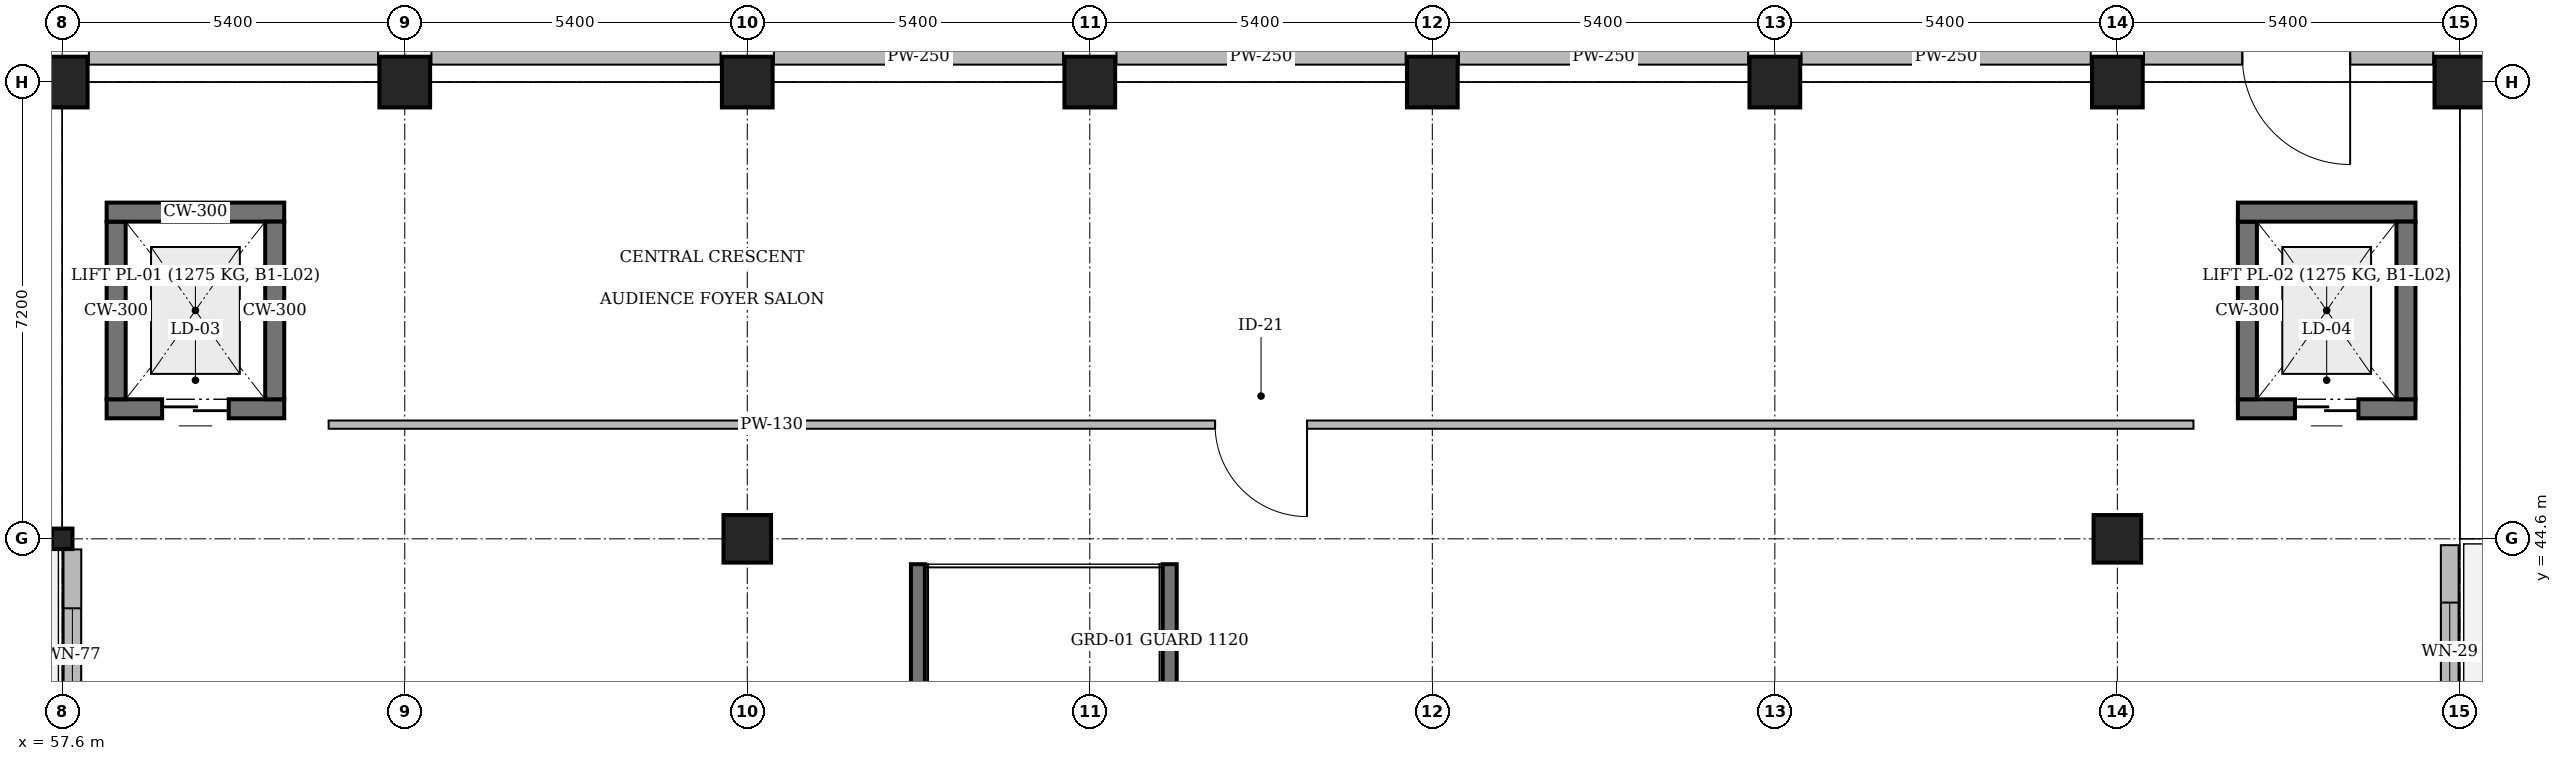
"""IFC4 building model, lengths in metres.
Left out: names, types, materials, properties, quantities, classifications, styles, units other than length and angle.
Written with IfcOpenShell. Run it as: python <this file> out.ifc"""

import sys

from ifc_helpers import new_model, si_unit, direction, frame, frame_2d, origin, origin_2d, place, context, subcontext, project, spatial, rectangle, circle, hollow_circle, extrude, element, fill, save


model = new_model("IFC4")
c1 = context("Model", 3, precision=1e-05, world=origin(), true_north=direction((0.0, 1.0)))
c2 = subcontext(c1, "Body", "Model", "MODEL_VIEW")
j1 = project(units=[si_unit("LENGTHUNIT", "METRE"), si_unit("PLANEANGLEUNIT", "RADIAN")], contexts=[c1])
p1 = place(None, origin())
s1 = spatial("IfcSite", under=j1, at=p1, CompositionType="ELEMENT")
p2 = place(p1, origin())
s2 = spatial("IfcBuilding", under=s1, at=p2, CompositionType="ELEMENT")
p3 = place(p2, origin())
s3 = spatial("IfcBuildingStorey", under=s2, at=p3, CompositionType="ELEMENT", Elevation=0.0)
p4 = place(p3, frame((68.4, 44.6, 0.0), z_axis=(0.0, 0.0, 1.0), x_axis=(1.0, 0.0, 0.0)))
e1 = element("IfcColumn", 1, at=p4, inside=s3, PredefinedType="COLUMN", context=c2, shape_type="SweptSolid", body=[
    extrude(circle(Radius=0.375, at=origin_2d()), origin(), (0.0, 0.0, 1.0), 4.8),
])
for number, where, z_axis, x_axis in (
    (2, (68.4, 51.8, 0.0), (0.0, 0.0, 1.0), (1.0, 0.0, 0.0)),
    (3, (73.8, 51.8, 0.0), (0.0, 0.0, 1.0), (1.0, 0.0, 0.0)),
    (4, (79.2, 51.8, 0.0), (0.0, 0.0, 1.0), (1.0, 0.0, 0.0)),
    (5, (84.6, 51.8, 0.0), (0.0, 0.0, 1.0), (1.0, 0.0, 0.0)),
):
    element("IfcColumn", number, at=place(p3, frame(where, z_axis=z_axis, x_axis=x_axis)), inside=s3, PredefinedType="COLUMN", context=c2, shape_type="SweptSolid", body=[
        extrude(rectangle(XDim=0.8, YDim=0.8, at=origin_2d()), origin(), (0.0, 0.0, 1.0), 4.8),
    ])
p5 = place(p3, frame((90.0, 44.6, 0.0), z_axis=(0.0, 0.0, 1.0), x_axis=(1.0, 0.0, 0.0)))
e6 = element("IfcColumn", 6, at=p5, inside=s3, PredefinedType="COLUMN", context=c2, shape_type="SweptSolid", body=[
    extrude(circle(Radius=0.375, at=origin_2d()), origin(), (0.0, 0.0, 1.0), 4.8),
])
for number, where, z_axis, x_axis in (
    (7, (90.0, 51.8, 0.0), (0.0, 0.0, 1.0), (1.0, 0.0, 0.0)),
    (8, (95.4, 51.8, 0.0), (0.0, 0.0, 1.0), (1.0, 0.0, 0.0)),
):
    element("IfcColumn", number, at=place(p3, frame(where, z_axis=z_axis, x_axis=x_axis)), inside=s3, PredefinedType="COLUMN", context=c2, shape_type="SweptSolid", body=[
        extrude(rectangle(XDim=0.8, YDim=0.8, at=origin_2d()), origin(), (0.0, 0.0, 1.0), 4.8),
    ])
p6 = place(p3, frame((57.6, 44.6, 0.0), z_axis=(0.0, 0.0, 1.0), x_axis=(1.0, 0.0, 0.0)))
e9 = element("IfcColumn", 9, at=p6, inside=s3, PredefinedType="COLUMN", context=c2, shape_type="SweptSolid", body=[
    extrude(hollow_circle(Radius=0.162, WallThickness=0.012, at=origin_2d()), origin(), (0.0, 0.0, 1.0), 4.8),
])
for number, where, z_axis, x_axis in (
    (10, (57.6, 51.8, 0.0), (0.0, 0.0, 1.0), (1.0, 0.0, 0.0)),
    (11, (63.0, 51.8, 0.0), (0.0, 0.0, 1.0), (1.0, 0.0, 0.0)),
):
    element("IfcColumn", number, at=place(p3, frame(where, z_axis=z_axis, x_axis=x_axis)), inside=s3, PredefinedType="COLUMN", context=c2, shape_type="SweptSolid", body=[
        extrude(rectangle(XDim=0.8, YDim=0.8, at=origin_2d()), origin(), (0.0, 0.0, 1.0), 4.8),
    ])
p7 = place(p3, frame((61.1, 46.65, 0.0), z_axis=(0.0, 0.0, 1.0), x_axis=(-1.0, 0.0, 0.0)))
e12 = element("IfcWall", 12, at=p7, inside=s3, PredefinedType="SOLIDWALL", context=c2, shape_type="SweptSolid", body=[
    extrude(rectangle(XDim=2.8, YDim=0.3, at=frame_2d((1.4, 0.0))), origin(), (0.0, 0.0, 1.0), 4.8),
])
p8 = place(p7, frame((0.875, 0.0, 0.0)))
e13 = element("IfcOpeningElement", 13, at=p8, cuts=e12, PredefinedType="OPENING", context=c2, shape_type="SweptSolid", body=[
    extrude(rectangle(XDim=1.05, YDim=2.1, at=frame_2d((0.525, 1.05))), frame((0.0, 0.17, 0.0), z_axis=(0.0, -1.0, 0.0), x_axis=(1.0, 0.0, 0.0)), (0.0, 0.0, 1.0), 0.34),
])
for number, where, z_axis, x_axis in (
    (14, (58.45, 46.8, 0.0), (0.0, 0.0, 1.0), (0.0, 1.0, 0.0)),
    (15, (58.3, 49.75, 0.0), (0.0, 0.0, 1.0), (1.0, 0.0, 0.0)),
    (16, (60.95, 49.6, 0.0), (0.0, 0.0, 1.0), (0.0, -1.0, 0.0)),
):
    element("IfcWall", number, at=place(p3, frame(where, z_axis=z_axis, x_axis=x_axis)), inside=s3, PredefinedType="SOLIDWALL", context=c2, shape_type="SweptSolid", body=[
        extrude(rectangle(XDim=2.8, YDim=0.3, at=frame_2d((1.4, 0.0))), origin(), (0.0, 0.0, 1.0), 4.8),
    ])
p9 = place(p3, frame((94.7, 46.65, 0.0), z_axis=(0.0, 0.0, 1.0), x_axis=(-1.0, 0.0, 0.0)))
e17 = element("IfcWall", 17, at=p9, inside=s3, PredefinedType="SOLIDWALL", context=c2, shape_type="SweptSolid", body=[
    extrude(rectangle(XDim=2.8, YDim=0.3, at=frame_2d((1.4, 0.0))), origin(), (0.0, 0.0, 1.0), 4.8),
])
p10 = place(p9, frame((0.9, 0.0, 0.0)))
e18 = element("IfcOpeningElement", 18, at=p10, cuts=e17, PredefinedType="OPENING", context=c2, shape_type="SweptSolid", body=[
    extrude(rectangle(XDim=1.0, YDim=2.1, at=frame_2d((0.5, 1.05))), frame((0.0, 0.17, 0.0), z_axis=(0.0, -1.0, 0.0), x_axis=(1.0, 0.0, 0.0)), (0.0, 0.0, 1.0), 0.34),
])
for number, where, z_axis, x_axis in (
    (19, (92.05, 46.8, 0.0), (0.0, 0.0, 1.0), (0.0, 1.0, 0.0)),
    (20, (91.9, 49.75, 0.0), (0.0, 0.0, 1.0), (1.0, 0.0, 0.0)),
    (21, (94.55, 49.6, 0.0), (0.0, 0.0, 1.0), (0.0, -1.0, 0.0)),
):
    element("IfcWall", number, at=place(p3, frame(where, z_axis=z_axis, x_axis=x_axis)), inside=s3, PredefinedType="SOLIDWALL", context=c2, shape_type="SweptSolid", body=[
        extrude(rectangle(XDim=2.8, YDim=0.3, at=frame_2d((1.4, 0.0))), origin(), (0.0, 0.0, 1.0), 4.8),
    ])
for number, where, z_axis, x_axis in (
    (22, (71.09, 36.6, 0.0), (0.0, 0.0, 1.0), (0.0, 1.0, 0.0)),
    (23, (75.06, 36.6, 0.0), (0.0, 0.0, 1.0), (0.0, 1.0, 0.0)),
):
    element("IfcWall", number, at=place(p3, frame(where, z_axis=z_axis, x_axis=x_axis)), inside=s3, PredefinedType="SOLIDWALL", context=c2, shape_type="SweptSolid", body=[
        extrude(rectangle(XDim=7.6, YDim=0.22, at=frame_2d((3.8, 0.0))), origin(), (0.0, 0.0, 1.0), 4.8),
    ])
p11 = place(p3, frame((57.76, 37.78, 0.0), z_axis=(0.0, 0.0, 1.0), x_axis=(0.0, 1.0, 0.0)))
e24 = element("IfcWall", 24, at=p11, inside=s3, PredefinedType="SOLIDWALL", context=c2, shape_type="SweptSolid", body=[
    extrude(rectangle(XDim=6.653, YDim=0.28, at=frame_2d((3.327, 0.0))), origin(), (0.0, 0.0, 1.0), 3.873),
])
p12 = place(p11, frame((0.928, 0.0, 0.95)))
e25 = element("IfcOpeningElement", 25, at=p12, cuts=e24, PredefinedType="OPENING", context=c2, shape_type="SweptSolid", body=[
    extrude(rectangle(XDim=1.47, YDim=1.95, at=frame_2d((0.735, 0.975))), frame((0.0, 0.16, 0.0), z_axis=(0.0, -1.0, 0.0), x_axis=(1.0, 0.0, 0.0)), (0.0, 0.0, 1.0), 0.32),
])
p13 = place(p11, frame((4.255, 0.0, 0.95)))
e26 = element("IfcOpeningElement", 26, at=p13, cuts=e24, PredefinedType="OPENING", context=c2, shape_type="SweptSolid", body=[
    extrude(rectangle(XDim=1.47, YDim=1.95, at=frame_2d((0.735, 0.975))), frame((0.0, 0.16, 0.0), z_axis=(0.0, -1.0, 0.0), x_axis=(1.0, 0.0, 0.0)), (0.0, 0.0, 1.0), 0.32),
])
p14 = place(p3, frame((95.24, 37.78, 0.0), z_axis=(0.0, 0.0, 1.0), x_axis=(0.0, 1.0, 0.0)))
e27 = element("IfcWall", 27, at=p14, inside=s3, PredefinedType="SOLIDWALL", context=c2, shape_type="SweptSolid", body=[
    extrude(rectangle(XDim=6.72, YDim=0.28, at=frame_2d((3.36, 0.0))), origin(), (0.0, 0.0, 1.0), 3.323),
])
p15 = place(p14, frame((0.905, 0.0, 0.95)))
e28 = element("IfcOpeningElement", 28, at=p15, cuts=e27, PredefinedType="OPENING", context=c2, shape_type="SweptSolid", body=[
    extrude(rectangle(XDim=1.55, YDim=1.8, at=frame_2d((0.775, 0.9))), frame((0.0, 0.16, 0.0), z_axis=(0.0, -1.0, 0.0), x_axis=(1.0, 0.0, 0.0)), (0.0, 0.0, 1.0), 0.32),
])
p16 = place(p14, frame((4.265, 0.0, 0.95)))
e29 = element("IfcOpeningElement", 29, at=p16, cuts=e27, PredefinedType="OPENING", context=c2, shape_type="SweptSolid", body=[
    extrude(rectangle(XDim=1.55, YDim=1.8, at=frame_2d((0.775, 0.9))), frame((0.0, 0.16, 0.0), z_axis=(0.0, -1.0, 0.0), x_axis=(1.0, 0.0, 0.0)), (0.0, 0.0, 1.0), 0.32),
])
p17 = place(p3, frame((94.98, 52.2, 0.0), z_axis=(0.0, 0.0, 1.0), x_axis=(-1.0, 0.0, 0.0)))
e30 = element("IfcWall", 30, at=p17, inside=s3, PredefinedType="PARTITIONING", context=c2, shape_type="SweptSolid", body=[
    extrude(rectangle(XDim=4.56, YDim=0.25, at=frame_2d((2.28, 0.0))), origin(), (0.0, 0.0, 1.0), 4.54),
])
p18 = place(p17, frame((1.31, 0.0, 0.0)))
e31 = element("IfcOpeningElement", 31, at=p18, cuts=e30, PredefinedType="OPENING", context=c2, shape_type="SweptSolid", body=[
    extrude(rectangle(XDim=1.7, YDim=2.25, at=frame_2d((0.85, 1.125))), frame((0.0, 0.145, 0.0), z_axis=(0.0, -1.0, 0.0), x_axis=(1.0, 0.0, 0.0)), (0.0, 0.0, 1.0), 0.29),
])
p19 = place(p3, frame((89.58, 52.2, 0.0), z_axis=(0.0, 0.0, 1.0), x_axis=(-1.0, 0.0, 0.0)))
e32 = element("IfcWall", 32, at=p19, inside=s3, PredefinedType="PARTITIONING", context=c2, shape_type="SweptSolid", body=[
    extrude(rectangle(XDim=4.56, YDim=0.25, at=frame_2d((2.28, 0.0))), origin(), (0.0, 0.0, 1.0), 4.54),
])
p20 = place(p3, frame((84.18, 52.2, 0.0), z_axis=(0.0, 0.0, 1.0), x_axis=(-1.0, 0.0, 0.0)))
e33 = element("IfcWall", 33, at=p20, inside=s3, PredefinedType="PARTITIONING", context=c2, shape_type="SweptSolid", body=[
    extrude(rectangle(XDim=4.56, YDim=0.25, at=frame_2d((2.28, 0.0))), origin(), (0.0, 0.0, 1.0), 4.54),
])
p21 = place(p3, frame((78.78, 52.2, 0.0), z_axis=(0.0, 0.0, 1.0), x_axis=(-1.0, 0.0, 0.0)))
e34 = element("IfcWall", 34, at=p21, inside=s3, PredefinedType="PARTITIONING", context=c2, shape_type="SweptSolid", body=[
    extrude(rectangle(XDim=4.56, YDim=0.25, at=frame_2d((2.28, 0.0))), origin(), (0.0, 0.0, 1.0), 4.54),
])
p22 = place(p3, frame((73.38, 52.2, 0.0), z_axis=(0.0, 0.0, 1.0), x_axis=(-1.0, 0.0, 0.0)))
e35 = element("IfcWall", 35, at=p22, inside=s3, PredefinedType="PARTITIONING", context=c2, shape_type="SweptSolid", body=[
    extrude(rectangle(XDim=4.56, YDim=0.25, at=frame_2d((2.28, 0.0))), origin(), (0.0, 0.0, 1.0), 4.54),
])
for number, where, z_axis, x_axis in (
    (36, (67.98, 52.2, 0.0), (0.0, 0.0, 1.0), (-1.0, 0.0, 0.0)),
    (37, (62.58, 52.2, 0.0), (0.0, 0.0, 1.0), (-1.0, 0.0, 0.0)),
):
    element("IfcWall", number, at=place(p3, frame(where, z_axis=z_axis, x_axis=x_axis)), inside=s3, PredefinedType="PARTITIONING", context=c2, shape_type="SweptSolid", body=[
        extrude(rectangle(XDim=4.56, YDim=0.25, at=frame_2d((2.28, 0.0))), origin(), (0.0, 0.0, 1.0), 4.54),
    ])
p23 = place(p3, frame((91.2, 46.4, 0.0), z_axis=(0.0, 0.0, 1.0), x_axis=(-1.0, 0.0, 0.0)))
e38 = element("IfcWall", 38, at=p23, inside=s3, PredefinedType="PARTITIONING", context=c2, shape_type="SweptSolid", body=[
    extrude(rectangle(XDim=29.4, YDim=0.13, at=frame_2d((14.7, 0.0))), origin(), (0.0, 0.0, 1.0), 4.54),
])
p24 = place(p23, frame((13.975, 0.0, 0.0)))
e39 = element("IfcOpeningElement", 39, at=p24, cuts=e38, PredefinedType="OPENING", context=c2, shape_type="SweptSolid", body=[
    extrude(rectangle(XDim=1.45, YDim=2.2, at=frame_2d((0.725, 1.1))), frame((0.0, 0.085, 0.0), z_axis=(0.0, -1.0, 0.0), x_axis=(1.0, 0.0, 0.0)), (0.0, 0.0, 1.0), 0.17),
])
p25 = place(p8, origin())
e40 = element("IfcDoor", 40, at=p25, inside=s3, OperationType="DOUBLE_DOOR_SLIDING", PredefinedType="DOOR", context=c2, shape_type="SweptSolid", body=[
    extrude(rectangle(XDim=1.05, YDim=2.1, at=frame_2d((0.525, 1.05))), frame((0.0, 0.025, 0.0), z_axis=(0.0, -1.0, 0.0), x_axis=(1.0, 0.0, 0.0)), (0.0, 0.0, 1.0), 0.05),
])
fill(e13, e40)
p26 = place(p10, origin())
e41 = element("IfcDoor", 41, at=p26, inside=s3, OperationType="DOUBLE_DOOR_SLIDING", PredefinedType="DOOR", context=c2, shape_type="SweptSolid", body=[
    extrude(rectangle(XDim=1.0, YDim=2.1, at=frame_2d((0.5, 1.05))), frame((0.0, 0.025, 0.0), z_axis=(0.0, -1.0, 0.0), x_axis=(1.0, 0.0, 0.0)), (0.0, 0.0, 1.0), 0.05),
])
fill(e18, e41)
p27 = place(p13, origin())
e42 = element("IfcWindow", 42, at=p27, inside=s3, PartitioningType="SINGLE_PANEL", PredefinedType="WINDOW", context=c2, shape_type="SweptSolid", body=[
    extrude(rectangle(XDim=1.47, YDim=1.95, at=frame_2d((0.735, 0.975))), frame((0.0, 0.03, 0.0), z_axis=(0.0, -1.0, 0.0), x_axis=(1.0, 0.0, 0.0)), (0.0, 0.0, 1.0), 0.06),
])
fill(e26, e42)
p28 = place(p16, origin())
e43 = element("IfcWindow", 43, at=p28, inside=s3, PartitioningType="SINGLE_PANEL", PredefinedType="WINDOW", context=c2, shape_type="SweptSolid", body=[
    extrude(rectangle(XDim=1.55, YDim=1.8, at=frame_2d((0.775, 0.9))), frame((0.0, 0.03, 0.0), z_axis=(0.0, -1.0, 0.0), x_axis=(1.0, 0.0, 0.0)), (0.0, 0.0, 1.0), 0.06),
])
fill(e29, e43)
p29 = place(p18, origin())
e44 = element("IfcDoor", 44, at=p29, inside=s3, OperationType="DOUBLE_DOOR_SINGLE_SWING", PredefinedType="DOOR", context=c2, shape_type="SweptSolid", body=[
    extrude(rectangle(XDim=1.7, YDim=2.25, at=frame_2d((0.85, 1.125))), frame((0.0, 0.025, 0.0), z_axis=(0.0, -1.0, 0.0), x_axis=(1.0, 0.0, 0.0)), (0.0, 0.0, 1.0), 0.05),
])
fill(e31, e44)
p30 = place(p24, origin())
e45 = element("IfcDoor", 45, at=p30, inside=s3, OperationType="DOUBLE_DOOR_SINGLE_SWING", PredefinedType="DOOR", context=c2, shape_type="SweptSolid", body=[
    extrude(rectangle(XDim=1.45, YDim=2.2, at=frame_2d((0.725, 1.1))), frame((0.0, 0.025, 0.0), z_axis=(0.0, -1.0, 0.0), x_axis=(1.0, 0.0, 0.0)), (0.0, 0.0, 1.0), 0.05),
])
fill(e39, e45)
save(model, sys.argv[1])
